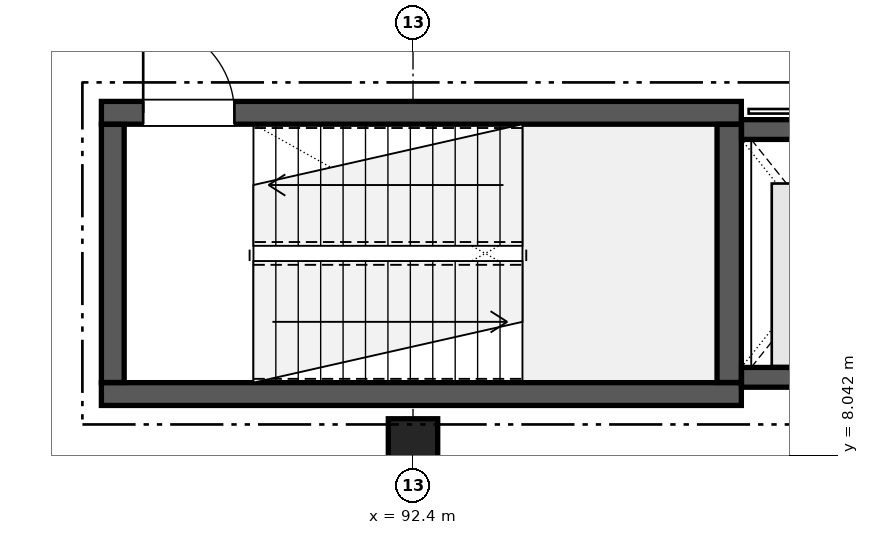
"""IFC4 building model, lengths in metres.
Left out: names, types, materials, properties, quantities, classifications, styles, units other than length and angle.
Written with IfcOpenShell. Run it as: python <this file> out.ifc"""

import sys

from ifc_helpers import new_model, si_unit, direction, frame, frame_2d, origin, origin_2d, place, context, subcontext, project, spatial, rectangle, extrude, element, fill, save


model = new_model("IFC4")
c1 = context("Model", 3, precision=1e-05, world=origin(), true_north=direction((0.0, 1.0)))
c2 = subcontext(c1, "Body", "Model", "MODEL_VIEW")
j1 = project(units=[si_unit("LENGTHUNIT", "METRE"), si_unit("PLANEANGLEUNIT", "RADIAN")], contexts=[c1])
p1 = place(None, origin())
s1 = spatial("IfcSite", under=j1, at=p1, CompositionType="ELEMENT")
p2 = place(p1, origin())
s2 = spatial("IfcBuilding", under=s1, at=p2, CompositionType="ELEMENT")
p3 = place(p2, frame((0.0, 0.0, 5.1)))
s3 = spatial("IfcBuildingStorey", under=s2, at=p3, CompositionType="ELEMENT", Elevation=5.1)
p4 = place(p3, frame((92.4, 8.2, 0.0), z_axis=(0.0, 0.0, 1.0), x_axis=(1.0, 0.0, 0.0)))
e1 = element("IfcColumn", 1, at=p4, inside=s3, PredefinedType="COLUMN", context=c2, shape_type="SweptSolid", body=[
    extrude(rectangle(XDim=0.65, YDim=0.65, at=origin_2d()), origin(), (0.0, 0.0, 1.0), 4.42),
])
p5 = place(p3, frame((88.3, 8.85, 0.0), z_axis=(0.0, 0.0, 1.0), x_axis=(1.0, 0.0, 0.0)))
e2 = element("IfcWall", 2, at=p5, inside=s3, PredefinedType="SHEAR", context=c2, shape_type="SweptSolid", body=[
    extrude(rectangle(XDim=8.42, YDim=0.3, at=frame_2d((4.21, 0.0))), origin(), (0.0, 0.0, 1.0), 4.105),
])
p6 = place(p3, frame((88.3, 12.55, 0.0), z_axis=(0.0, 0.0, 1.0), x_axis=(1.0, 0.0, 0.0)))
e3 = element("IfcWall", 3, at=p6, inside=s3, PredefinedType="SHEAR", context=c2, shape_type="SweptSolid", body=[
    extrude(rectangle(XDim=8.42, YDim=0.3, at=frame_2d((4.21, 0.0))), origin(), (0.0, 0.0, 1.0), 4.105),
])
p7 = place(p6, frame((0.55, 0.0, 0.0)))
e4 = element("IfcOpeningElement", 4, at=p7, cuts=e3, PredefinedType="OPENING", context=c2, shape_type="SweptSolid", body=[
    extrude(rectangle(XDim=1.2, YDim=2.2, at=frame_2d((0.6, 1.1))), frame((0.0, 0.16, 0.0), z_axis=(0.0, -1.0, 0.0), x_axis=(1.0, 0.0, 0.0)), (0.0, 0.0, 1.0), 0.32),
])
p8 = place(p3, frame((88.45, 9.002, 0.0), z_axis=(0.0, 0.0, 1.0), x_axis=(0.0, 1.0, 0.0)))
e5 = element("IfcWall", 5, at=p8, inside=s3, PredefinedType="SHEAR", context=c2, shape_type="SweptSolid", body=[
    extrude(rectangle(XDim=3.396, YDim=0.3, at=frame_2d((1.698, 0.0))), origin(), (0.0, 0.0, 1.0), 4.105),
])
p9 = place(p3, frame((96.56, 9.002, 0.0), z_axis=(0.0, 0.0, 1.0), x_axis=(0.0, 1.0, 0.0)))
e6 = element("IfcWall", 6, at=p9, inside=s3, PredefinedType="SHEAR", context=c2, shape_type="SweptSolid", body=[
    extrude(rectangle(XDim=3.396, YDim=0.32, at=frame_2d((1.698, 0.0))), origin(), (0.0, 0.0, 1.0), 4.105),
])
p10 = place(p3, frame((96.722, 9.07, 0.0), z_axis=(0.0, 0.0, 1.0), x_axis=(1.0, 0.0, 0.0)))
e7 = element("IfcWall", 7, at=p10, inside=s3, PredefinedType="SHEAR", context=c2, shape_type="SweptSolid", body=[
    extrude(rectangle(XDim=2.658, YDim=0.26, at=frame_2d((1.329, 0.0))), origin(), (0.0, 0.0, 1.0), 4.105),
])
p11 = place(p3, frame((96.722, 12.33, 0.0), z_axis=(0.0, 0.0, 1.0), x_axis=(1.0, 0.0, 0.0)))
e8 = element("IfcWall", 8, at=p11, inside=s3, PredefinedType="SHEAR", context=c2, shape_type="SweptSolid", body=[
    extrude(rectangle(XDim=2.658, YDim=0.26, at=frame_2d((1.329, 0.0))), origin(), (0.0, 0.0, 1.0), 4.105),
])
p12 = place(p11, frame((0.679, 0.0, 0.0)))
e9 = element("IfcOpeningElement", 9, at=p12, cuts=e8, PredefinedType="OPENING", context=c2, shape_type="SweptSolid", body=[
    extrude(rectangle(XDim=1.3, YDim=2.2, at=frame_2d((0.65, 1.1))), frame((0.0, 0.14, 0.0), z_axis=(0.0, -1.0, 0.0), x_axis=(1.0, 0.0, 0.0)), (0.0, 0.0, 1.0), 0.28),
])
p13 = place(p7, origin())
e10 = element("IfcDoor", 10, at=p13, inside=s3, OperationType="SINGLE_SWING_LEFT", PredefinedType="DOOR", context=c2, shape_type="SweptSolid", body=[
    extrude(rectangle(XDim=1.2, YDim=2.2, at=frame_2d((0.6, 1.1))), frame((0.0, 0.025, 0.0), z_axis=(0.0, -1.0, 0.0), x_axis=(1.0, 0.0, 0.0)), (0.0, 0.0, 1.0), 0.05),
])
fill(e4, e10)
save(model, sys.argv[1])
